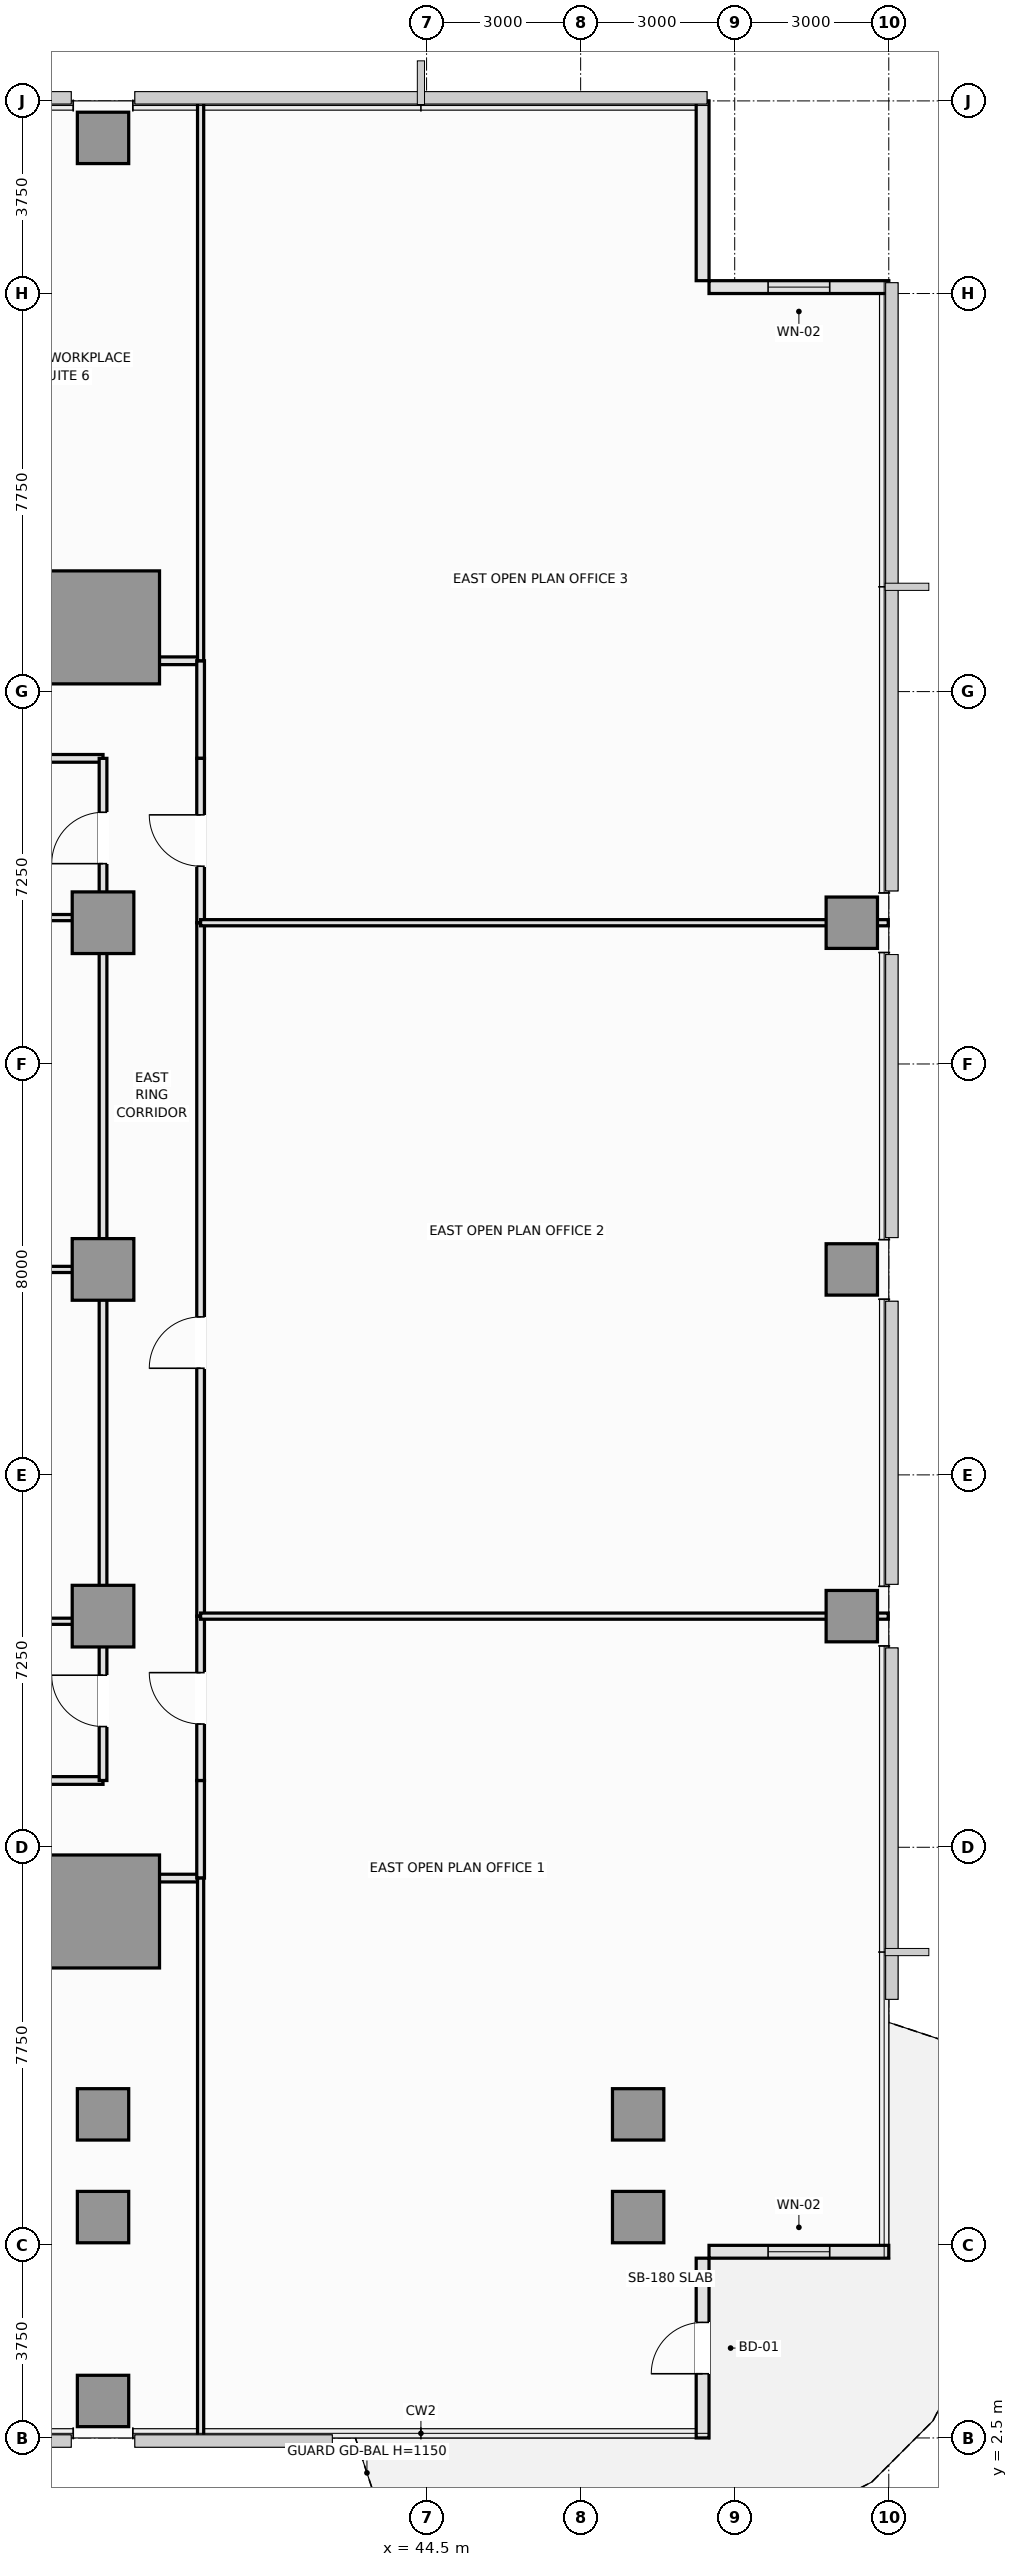
"""IFC4 building model, lengths in metres.
Left out: names, types, materials, properties, quantities, classifications, styles, units other than length and angle.
Written with IfcOpenShell. Run it as: python <this file> out.ifc"""

import sys

from ifc_helpers import new_model, si_unit, direction, frame, frame_2d, origin, origin_2d, place, context, subcontext, project, spatial, rectangle, extrude, element, fill, save


model = new_model("IFC4")
c1 = context("Model", 3, precision=1e-05, world=origin(), true_north=direction((0.0, 1.0)))
c2 = subcontext(c1, "Body", "Model", "MODEL_VIEW")
j1 = project(units=[si_unit("LENGTHUNIT", "METRE"), si_unit("PLANEANGLEUNIT", "RADIAN")], contexts=[c1])
p1 = place(None, origin())
s1 = spatial("IfcSite", under=j1, at=p1, CompositionType="ELEMENT")
p2 = place(p1, origin())
s2 = spatial("IfcBuilding", under=s1, at=p2, CompositionType="ELEMENT")
p3 = place(p2, frame((0.0, 0.0, 46.9)))
s3 = spatial("IfcBuildingStorey", under=s2, at=p3, CompositionType="ELEMENT", Elevation=46.9)
for number, where, z_axis, x_axis in (
    (1, (38.2, 12.75, 0.0), (0.0, 0.0, 1.0), (1.0, 0.0, 0.0)),
    (2, (38.2, 37.75, 0.0), (0.0, 0.0, 1.0), (1.0, 0.0, 0.0)),
):
    element("IfcColumn", number, at=place(p3, frame(where, z_axis=z_axis, x_axis=x_axis)), inside=s3, PredefinedType="COLUMN", context=c2, shape_type="SweptSolid", body=[
        extrude(rectangle(XDim=2.2, YDim=2.2, at=origin_2d()), origin(), (0.0, 0.0, 1.0), 3.55),
    ])
for number, where, z_axis, x_axis in (
    (3, (38.2, 18.5, 0.0), (0.0, 0.0, 1.0), (1.0, 0.0, 0.0)),
    (4, (38.2, 25.25, 0.0), (0.0, 0.0, 1.0), (1.0, 0.0, 0.0)),
    (5, (38.2, 32.0, 0.0), (0.0, 0.0, 1.0), (1.0, 0.0, 0.0)),
):
    element("IfcColumn", number, at=place(p3, frame(where, z_axis=z_axis, x_axis=x_axis)), inside=s3, PredefinedType="COLUMN", context=c2, shape_type="SweptSolid", body=[
        extrude(rectangle(XDim=1.2, YDim=1.2, at=origin_2d()), origin(), (0.0, 0.0, 1.0), 3.55),
    ])
for number, where, z_axis, x_axis in (
    (6, (48.62, 6.8, 0.0), (0.0, 0.0, 1.0), (1.0, 0.0, 0.0)),
    (7, (38.2, 6.8, 0.0), (0.0, 0.0, 1.0), (1.0, 0.0, 0.0)),
    (8, (38.2, 8.8, 0.0), (0.0, 0.0, 1.0), (1.0, 0.0, 0.0)),
    (9, (48.62, 8.8, 0.0), (0.0, 0.0, 1.0), (1.0, 0.0, 0.0)),
    (10, (52.78, 18.5, 0.0), (0.0, 0.0, 1.0), (1.0, 0.0, 0.0)),
    (11, (52.78, 25.25, 0.0), (0.0, 0.0, 1.0), (1.0, 0.0, 0.0)),
    (12, (52.78, 32.0, 0.0), (0.0, 0.0, 1.0), (1.0, 0.0, 0.0)),
    (13, (38.2, 3.22, 0.0), (0.0, 0.0, 1.0), (1.0, 0.0, 0.0)),
    (14, (38.2, 47.28, 0.0), (0.0, 0.0, 1.0), (1.0, 0.0, 0.0)),
):
    element("IfcColumn", number, at=place(p3, frame(where, z_axis=z_axis, x_axis=x_axis)), inside=s3, PredefinedType="COLUMN", context=c2, shape_type="SweptSolid", body=[
        extrude(rectangle(XDim=1.0, YDim=1.0, at=origin_2d()), origin(), (0.0, 0.0, 1.0), 3.55),
    ])
p4 = place(p3, frame((49.875, 2.5, 0.0), z_axis=(0.0, 0.0, 1.0), x_axis=(0.0, 1.0, 0.0)))
e15 = element("IfcWall", 15, at=p4, inside=s3, PredefinedType="SOLIDWALL", context=c2, shape_type="SweptSolid", body=[
    extrude(rectangle(XDim=3.5, YDim=0.25, at=frame_2d((1.75, 0.0))), origin(), (0.0, 0.0, 1.0), 3.07),
])
p5 = place(p4, frame((1.25, 0.0, 0.0)))
e16 = element("IfcOpeningElement", 16, at=p5, cuts=e15, PredefinedType="OPENING", context=c2, shape_type="SweptSolid", body=[
    extrude(rectangle(XDim=1.0, YDim=2.2, at=frame_2d((0.5, 1.1))), frame((0.0, 0.135, 0.0), z_axis=(0.0, -1.0, 0.0), x_axis=(1.0, 0.0, 0.0)), (0.0, 0.0, 1.0), 0.27),
])
p6 = place(p3, frame((50.0, 6.125, 0.0), z_axis=(0.0, 0.0, 1.0), x_axis=(1.0, 0.0, 0.0)))
e17 = element("IfcWall", 17, at=p6, inside=s3, PredefinedType="SOLIDWALL", context=c2, shape_type="SweptSolid", body=[
    extrude(rectangle(XDim=3.5, YDim=0.25, at=frame_2d((1.75, 0.0))), origin(), (0.0, 0.0, 1.0), 3.07),
])
p7 = place(p6, frame((1.15, 0.0, 0.9)))
e18 = element("IfcOpeningElement", 18, at=p7, cuts=e17, PredefinedType="OPENING", context=c2, shape_type="SweptSolid", body=[
    extrude(rectangle(XDim=1.2, YDim=1.8, at=frame_2d((0.6, 0.9))), frame((0.0, 0.135, 0.0), z_axis=(0.0, -1.0, 0.0), x_axis=(1.0, 0.0, 0.0)), (0.0, 0.0, 1.0), 0.27),
])
p8 = place(p3, frame((53.5, 44.375, 0.0), z_axis=(0.0, 0.0, 1.0), x_axis=(-1.0, 0.0, 0.0)))
e19 = element("IfcWall", 19, at=p8, inside=s3, PredefinedType="SOLIDWALL", context=c2, shape_type="SweptSolid", body=[
    extrude(rectangle(XDim=3.5, YDim=0.25, at=frame_2d((1.75, 0.0))), origin(), (0.0, 0.0, 1.0), 3.37),
])
p9 = place(p8, frame((1.15, 0.0, 0.9)))
e20 = element("IfcOpeningElement", 20, at=p9, cuts=e19, PredefinedType="OPENING", context=c2, shape_type="SweptSolid", body=[
    extrude(rectangle(XDim=1.2, YDim=1.8, at=frame_2d((0.6, 0.9))), frame((0.0, 0.135, 0.0), z_axis=(0.0, -1.0, 0.0), x_axis=(1.0, 0.0, 0.0)), (0.0, 0.0, 1.0), 0.27),
])
p10 = place(p3, frame((49.875, 44.5, 0.0), z_axis=(0.0, 0.0, 1.0), x_axis=(0.0, 1.0, 0.0)))
e21 = element("IfcWall", 21, at=p10, inside=s3, PredefinedType="SOLIDWALL", context=c2, shape_type="SweptSolid", body=[
    extrude(rectangle(XDim=3.5, YDim=0.25, at=frame_2d((1.75, 0.0))), origin(), (0.0, 0.0, 1.0), 3.37),
])
p11 = place(p3, frame((29.8, 15.3, 0.0), z_axis=(0.0, 0.0, 1.0), x_axis=(1.0, 0.0, 0.0)))
e22 = element("IfcWall", 22, at=p11, inside=s3, PredefinedType="PARTITIONING", context=c2, shape_type="SweptSolid", body=[
    extrude(rectangle(XDim=8.4, YDim=0.15, at=frame_2d((4.2, 0.0))), origin(), (0.0, 0.0, 1.0), 3.37),
])
p12 = place(p3, frame((19.9, 13.4, 0.0), z_axis=(0.0, 0.0, 1.0), x_axis=(1.0, 0.0, 0.0)))
e23 = element("IfcWall", 23, at=p12, inside=s3, PredefinedType="PARTITIONING", context=c2, shape_type="SweptSolid", body=[
    extrude(rectangle(XDim=20.2, YDim=0.15, at=frame_2d((10.1, 0.0))), origin(), (0.0, 0.0, 1.0), 3.37),
])
p13 = place(p12, frame((9.6, 0.0, 0.0)))
e24 = element("IfcOpeningElement", 24, at=p13, cuts=e23, PredefinedType="OPENING", context=c2, shape_type="SweptSolid", body=[
    extrude(rectangle(XDim=1.0, YDim=2.15, at=frame_2d((0.5, 1.075))), frame((0.0, 0.085, 0.0), z_axis=(0.0, -1.0, 0.0), x_axis=(1.0, 0.0, 0.0)), (0.0, 0.0, 1.0), 0.17),
])
p14 = place(p3, frame((40.1, 13.4, 0.0), z_axis=(0.0, 0.0, 1.0), x_axis=(0.0, 1.0, 0.0)))
e25 = element("IfcWall", 25, at=p14, inside=s3, PredefinedType="PARTITIONING", context=c2, shape_type="SweptSolid", body=[
    extrude(rectangle(XDim=1.9, YDim=0.15, at=frame_2d((0.95, 0.0))), origin(), (0.0, 0.0, 1.0), 3.37),
])
p15 = place(p3, frame((29.8, 35.2, 0.0), z_axis=(0.0, 0.0, 1.0), x_axis=(1.0, 0.0, 0.0)))
e26 = element("IfcWall", 26, at=p15, inside=s3, PredefinedType="PARTITIONING", context=c2, shape_type="SweptSolid", body=[
    extrude(rectangle(XDim=8.4, YDim=0.15, at=frame_2d((4.2, 0.0))), origin(), (0.0, 0.0, 1.0), 3.37),
])
p16 = place(p3, frame((34.8, 37.1, 0.0), z_axis=(0.0, 0.0, 1.0), x_axis=(1.0, 0.0, 0.0)))
e27 = element("IfcWall", 27, at=p16, inside=s3, PredefinedType="PARTITIONING", context=c2, shape_type="SweptSolid", body=[
    extrude(rectangle(XDim=5.3, YDim=0.15, at=frame_2d((2.65, 0.0))), origin(), (0.0, 0.0, 1.0), 3.37),
])
p17 = place(p16, frame((0.91, 0.0, 0.0)))
e28 = element("IfcOpeningElement", 28, at=p17, cuts=e27, PredefinedType="OPENING", context=c2, shape_type="SweptSolid", body=[
    extrude(rectangle(XDim=1.0, YDim=2.15, at=frame_2d((0.5, 1.075))), frame((0.0, 0.085, 0.0), z_axis=(0.0, -1.0, 0.0), x_axis=(1.0, 0.0, 0.0)), (0.0, 0.0, 1.0), 0.17),
])
p18 = place(p3, frame((40.1, 35.2, 0.0), z_axis=(0.0, 0.0, 1.0), x_axis=(0.0, 1.0, 0.0)))
e29 = element("IfcWall", 29, at=p18, inside=s3, PredefinedType="PARTITIONING", context=c2, shape_type="SweptSolid", body=[
    extrude(rectangle(XDim=1.9, YDim=0.15, at=frame_2d((0.95, 0.0))), origin(), (0.0, 0.0, 1.0), 3.37),
])
p19 = place(p3, frame((38.2, 15.3, 0.0), z_axis=(0.0, 0.0, 1.0), x_axis=(0.0, 1.0, 0.0)))
e30 = element("IfcWall", 30, at=p19, inside=s3, PredefinedType="PARTITIONING", context=c2, shape_type="SweptSolid", body=[
    extrude(rectangle(XDim=3.1, YDim=0.15, at=frame_2d((1.55, 0.0))), origin(), (0.0, 0.0, 1.0), 2.82),
])
p20 = place(p19, frame((1.05, 0.0, 0.0)))
e31 = element("IfcOpeningElement", 31, at=p20, cuts=e30, PredefinedType="OPENING", context=c2, shape_type="SweptSolid", body=[
    extrude(rectangle(XDim=1.0, YDim=2.15, at=frame_2d((0.5, 1.075))), frame((0.0, 0.085, 0.0), z_axis=(0.0, -1.0, 0.0), x_axis=(1.0, 0.0, 0.0)), (0.0, 0.0, 1.0), 0.17),
])
p21 = place(p3, frame((38.2, 32.1, 0.0), z_axis=(0.0, 0.0, 1.0), x_axis=(0.0, 1.0, 0.0)))
e32 = element("IfcWall", 32, at=p21, inside=s3, PredefinedType="PARTITIONING", context=c2, shape_type="SweptSolid", body=[
    extrude(rectangle(XDim=3.1, YDim=0.15, at=frame_2d((1.55, 0.0))), origin(), (0.0, 0.0, 1.0), 2.82),
])
p22 = place(p21, frame((1.05, 0.0, 0.0)))
e33 = element("IfcOpeningElement", 33, at=p22, cuts=e32, PredefinedType="OPENING", context=c2, shape_type="SweptSolid", body=[
    extrude(rectangle(XDim=1.0, YDim=2.15, at=frame_2d((0.5, 1.075))), frame((0.0, 0.085, 0.0), z_axis=(0.0, -1.0, 0.0), x_axis=(1.0, 0.0, 0.0)), (0.0, 0.0, 1.0), 0.17),
])
for number, where, z_axis, x_axis in (
    (34, (38.2, 18.4, 0.0), (0.0, 0.0, 1.0), (0.0, 1.0, 0.0)),
    (35, (38.2, 25.25, 0.0), (0.0, 0.0, 1.0), (0.0, 1.0, 0.0)),
):
    element("IfcWall", number, at=place(p3, frame(where, z_axis=z_axis, x_axis=x_axis)), inside=s3, PredefinedType="PARTITIONING", context=c2, shape_type="SweptSolid", body=[
        extrude(rectangle(XDim=6.85, YDim=0.15, at=frame_2d((3.425, 0.0))), origin(), (0.0, 0.0, 1.0), 2.82),
    ])
p23 = place(p3, frame((40.1, 15.3, 0.0), z_axis=(0.0, 0.0, 1.0), x_axis=(0.0, 1.0, 0.0)))
e36 = element("IfcWall", 36, at=p23, inside=s3, PredefinedType="PARTITIONING", context=c2, shape_type="SweptSolid", body=[
    extrude(rectangle(XDim=3.2, YDim=0.15, at=frame_2d((1.6, 0.0))), origin(), (0.0, 0.0, 1.0), 3.37),
])
p24 = place(p23, frame((1.1, 0.0, 0.0)))
e37 = element("IfcOpeningElement", 37, at=p24, cuts=e36, PredefinedType="OPENING", context=c2, shape_type="SweptSolid", body=[
    extrude(rectangle(XDim=1.0, YDim=2.15, at=frame_2d((0.5, 1.075))), frame((0.0, 0.085, 0.0), z_axis=(0.0, -1.0, 0.0), x_axis=(1.0, 0.0, 0.0)), (0.0, 0.0, 1.0), 0.17),
])
p25 = place(p3, frame((40.1, 18.5, 0.0), z_axis=(0.0, 0.0, 1.0), x_axis=(0.0, 1.0, 0.0)))
e38 = element("IfcWall", 38, at=p25, inside=s3, PredefinedType="PARTITIONING", context=c2, shape_type="SweptSolid", body=[
    extrude(rectangle(XDim=13.5, YDim=0.15, at=frame_2d((6.75, 0.0))), origin(), (0.0, 0.0, 1.0), 3.37),
])
p26 = place(p25, frame((4.826, 0.0, 0.0)))
e39 = element("IfcOpeningElement", 39, at=p26, cuts=e38, PredefinedType="OPENING", context=c2, shape_type="SweptSolid", body=[
    extrude(rectangle(XDim=1.0, YDim=2.15, at=frame_2d((0.5, 1.075))), frame((0.0, 0.085, 0.0), z_axis=(0.0, -1.0, 0.0), x_axis=(1.0, 0.0, 0.0)), (0.0, 0.0, 1.0), 0.17),
])
p27 = place(p3, frame((40.1, 32.0, 0.0), z_axis=(0.0, 0.0, 1.0), x_axis=(0.0, 1.0, 0.0)))
e40 = element("IfcWall", 40, at=p27, inside=s3, PredefinedType="PARTITIONING", context=c2, shape_type="SweptSolid", body=[
    extrude(rectangle(XDim=3.2, YDim=0.15, at=frame_2d((1.6, 0.0))), origin(), (0.0, 0.0, 1.0), 3.37),
])
p28 = place(p27, frame((1.1, 0.0, 0.0)))
e41 = element("IfcOpeningElement", 41, at=p28, cuts=e40, PredefinedType="OPENING", context=c2, shape_type="SweptSolid", body=[
    extrude(rectangle(XDim=1.0, YDim=2.15, at=frame_2d((0.5, 1.075))), frame((0.0, 0.085, 0.0), z_axis=(0.0, -1.0, 0.0), x_axis=(1.0, 0.0, 0.0)), (0.0, 0.0, 1.0), 0.17),
])
for number, where, z_axis, x_axis in (
    (42, (29.8, 18.4, 0.0), (0.0, 0.0, 1.0), (1.0, 0.0, 0.0)),
    (43, (29.8, 32.1, 0.0), (0.0, 0.0, 1.0), (1.0, 0.0, 0.0)),
):
    element("IfcWall", number, at=place(p3, frame(where, z_axis=z_axis, x_axis=x_axis)), inside=s3, PredefinedType="PARTITIONING", context=c2, shape_type="SweptSolid", body=[
        extrude(rectangle(XDim=8.4, YDim=0.12, at=frame_2d((4.2, 0.0))), origin(), (0.0, 0.0, 1.0), 2.72),
    ])
p29 = place(p3, frame((24.45, 25.25, 0.0), z_axis=(0.0, 0.0, 1.0), x_axis=(1.0, 0.0, 0.0)))
e44 = element("IfcWall", 44, at=p29, inside=s3, PredefinedType="PARTITIONING", context=c2, shape_type="SweptSolid", body=[
    extrude(rectangle(XDim=13.75, YDim=0.12, at=frame_2d((6.875, 0.0))), origin(), (0.0, 0.0, 1.0), 2.72),
])
for number, where, z_axis, x_axis in (
    (45, (40.1, 2.51, 0.0), (0.0, 0.0, 1.0), (0.0, 1.0, 0.0)),
    (46, (40.1, 37.1, 0.0), (0.0, 0.0, 1.0), (0.0, 1.0, 0.0)),
):
    element("IfcWall", number, at=place(p3, frame(where, z_axis=z_axis, x_axis=x_axis)), inside=s3, PredefinedType="PARTITIONING", context=c2, shape_type="SweptSolid", body=[
        extrude(rectangle(XDim=10.89, YDim=0.12, at=frame_2d((5.445, 0.0))), origin(), (0.0, 0.0, 1.0), 3.37),
    ])
for number, where, z_axis, x_axis in (
    (47, (40.1, 18.5, 0.0), (0.0, 0.0, 1.0), (1.0, 0.0, 0.0)),
    (48, (40.1, 32.0, 0.0), (0.0, 0.0, 1.0), (1.0, 0.0, 0.0)),
):
    element("IfcWall", number, at=place(p3, frame(where, z_axis=z_axis, x_axis=x_axis)), inside=s3, PredefinedType="PARTITIONING", context=c2, shape_type="SweptSolid", body=[
        extrude(rectangle(XDim=13.39, YDim=0.12, at=frame_2d((6.695, 0.0))), origin(), (0.0, 0.0, 1.0), 2.72),
    ])
p30 = place(p5, frame((1.0, 0.0, 0.0), z_axis=(0.0, 0.0, 1.0), x_axis=(-1.0, 0.0, 0.0)))
e49 = element("IfcDoor", 49, at=p30, inside=s3, OperationType="SINGLE_SWING_LEFT", PredefinedType="DOOR", context=c2, shape_type="SweptSolid", body=[
    extrude(rectangle(XDim=1.0, YDim=2.2, at=frame_2d((0.5, 1.1))), frame((0.0, 0.025, 0.0), z_axis=(0.0, -1.0, 0.0), x_axis=(1.0, 0.0, 0.0)), (0.0, 0.0, 1.0), 0.05),
])
fill(e16, e49)
p31 = place(p7, origin())
e50 = element("IfcWindow", 50, at=p31, inside=s3, PartitioningType="SINGLE_PANEL", PredefinedType="WINDOW", context=c2, shape_type="SweptSolid", body=[
    extrude(rectangle(XDim=1.2, YDim=1.8, at=frame_2d((0.6, 0.9))), frame((0.0, 0.03, 0.0), z_axis=(0.0, -1.0, 0.0), x_axis=(1.0, 0.0, 0.0)), (0.0, 0.0, 1.0), 0.06),
])
fill(e18, e50)
p32 = place(p9, origin())
e51 = element("IfcWindow", 51, at=p32, inside=s3, PartitioningType="SINGLE_PANEL", PredefinedType="WINDOW", context=c2, shape_type="SweptSolid", body=[
    extrude(rectangle(XDim=1.2, YDim=1.8, at=frame_2d((0.6, 0.9))), frame((0.0, 0.03, 0.0), z_axis=(0.0, -1.0, 0.0), x_axis=(1.0, 0.0, 0.0)), (0.0, 0.0, 1.0), 0.06),
])
fill(e20, e51)
p33 = place(p20, origin())
e52 = element("IfcDoor", 52, at=p33, inside=s3, OperationType="SINGLE_SWING_RIGHT", PredefinedType="DOOR", context=c2, shape_type="SweptSolid", body=[
    extrude(rectangle(XDim=1.0, YDim=2.15, at=frame_2d((0.5, 1.075))), frame((0.0, 0.025, 0.0), z_axis=(0.0, -1.0, 0.0), x_axis=(1.0, 0.0, 0.0)), (0.0, 0.0, 1.0), 0.05),
])
fill(e31, e52)
p34 = place(p22, origin())
e53 = element("IfcDoor", 53, at=p34, inside=s3, OperationType="SINGLE_SWING_LEFT", PredefinedType="DOOR", context=c2, shape_type="SweptSolid", body=[
    extrude(rectangle(XDim=1.0, YDim=2.15, at=frame_2d((0.5, 1.075))), frame((0.0, 0.025, 0.0), z_axis=(0.0, -1.0, 0.0), x_axis=(1.0, 0.0, 0.0)), (0.0, 0.0, 1.0), 0.05),
])
fill(e33, e53)
p35 = place(p24, origin())
e54 = element("IfcDoor", 54, at=p35, inside=s3, OperationType="SINGLE_SWING_RIGHT", PredefinedType="DOOR", context=c2, shape_type="SweptSolid", body=[
    extrude(rectangle(XDim=1.0, YDim=2.15, at=frame_2d((0.5, 1.075))), frame((0.0, 0.025, 0.0), z_axis=(0.0, -1.0, 0.0), x_axis=(1.0, 0.0, 0.0)), (0.0, 0.0, 1.0), 0.05),
])
fill(e37, e54)
p36 = place(p26, origin())
e55 = element("IfcDoor", 55, at=p36, inside=s3, OperationType="SINGLE_SWING_LEFT", PredefinedType="DOOR", context=c2, shape_type="SweptSolid", body=[
    extrude(rectangle(XDim=1.0, YDim=2.15, at=frame_2d((0.5, 1.075))), frame((0.0, 0.025, 0.0), z_axis=(0.0, -1.0, 0.0), x_axis=(1.0, 0.0, 0.0)), (0.0, 0.0, 1.0), 0.05),
])
fill(e39, e55)
p37 = place(p28, origin())
e56 = element("IfcDoor", 56, at=p37, inside=s3, OperationType="SINGLE_SWING_RIGHT", PredefinedType="DOOR", context=c2, shape_type="SweptSolid", body=[
    extrude(rectangle(XDim=1.0, YDim=2.15, at=frame_2d((0.5, 1.075))), frame((0.0, 0.025, 0.0), z_axis=(0.0, -1.0, 0.0), x_axis=(1.0, 0.0, 0.0)), (0.0, 0.0, 1.0), 0.05),
])
fill(e41, e56)
save(model, sys.argv[1])
